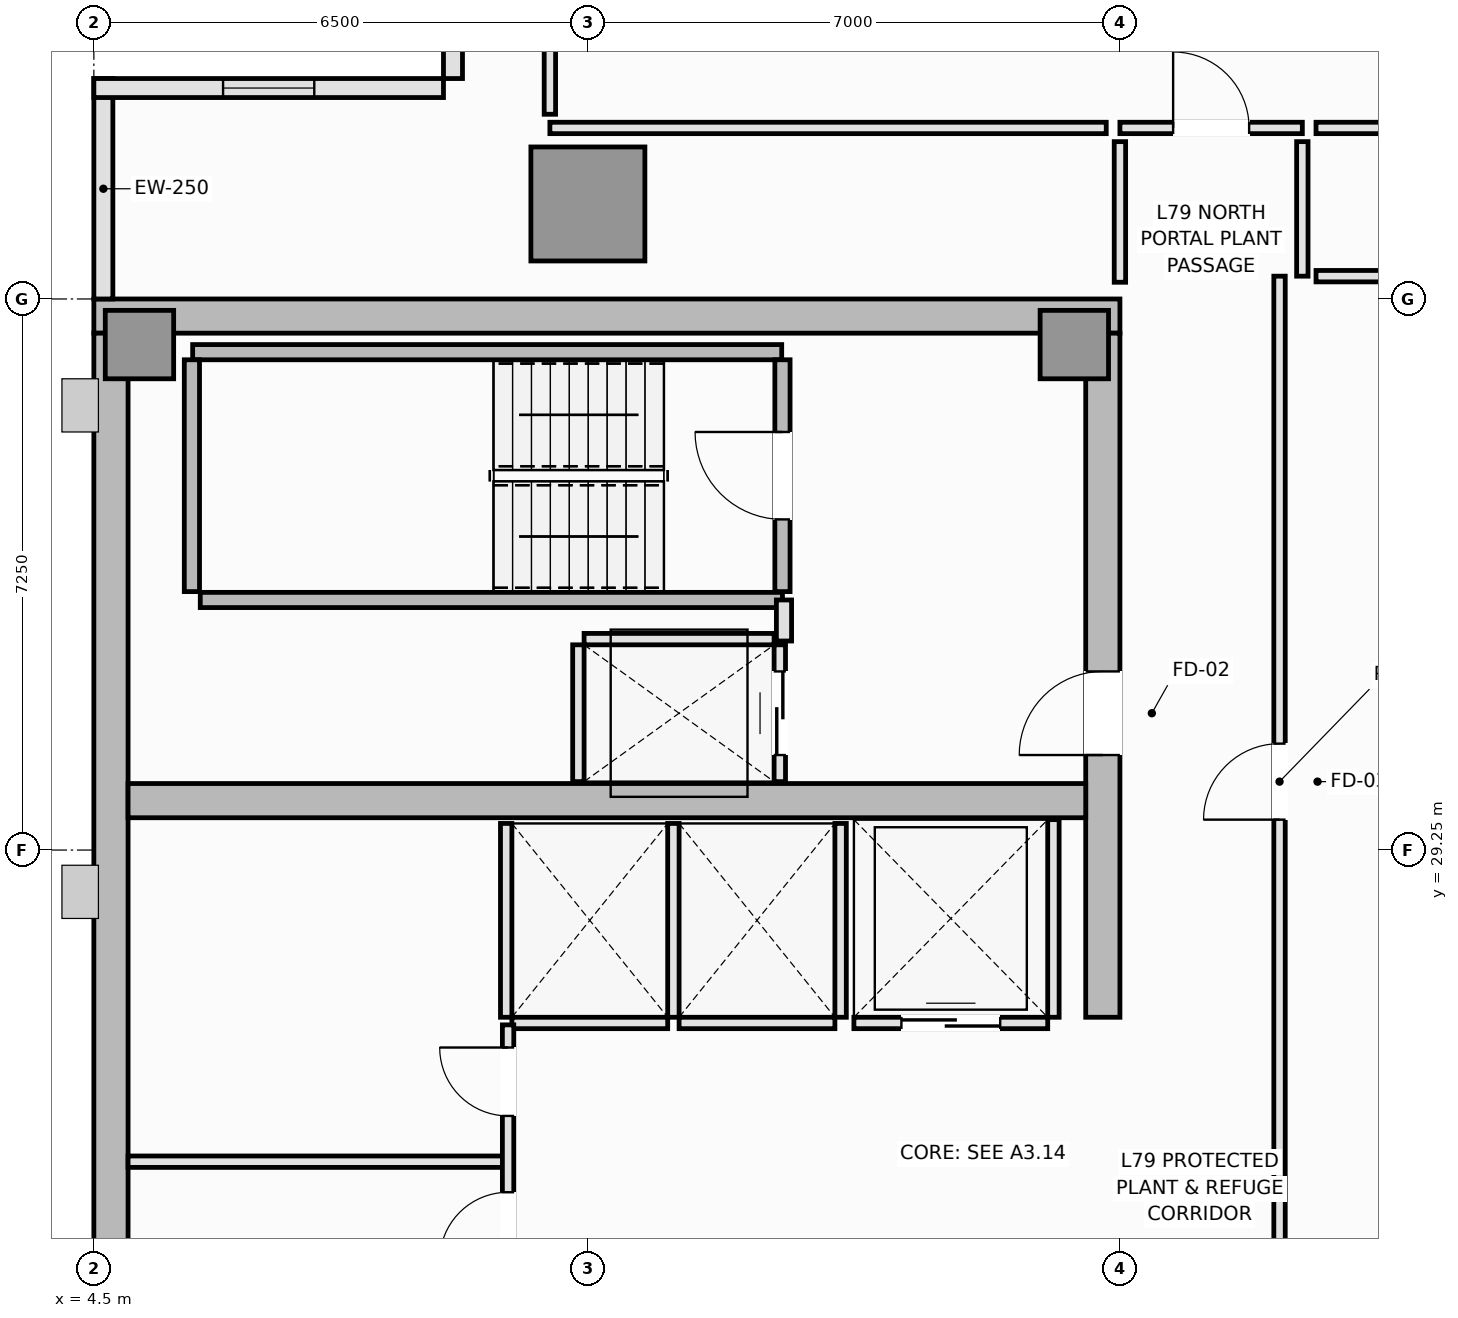
"""IFC4 building model, lengths in metres.
Left out: names, types, materials, properties, quantities, classifications, styles, units other than length and angle.
Written with IfcOpenShell. Run it as: python <this file> out.ifc"""

import sys

from ifc_helpers import new_model, si_unit, direction, frame, frame_2d, origin, origin_2d, place, context, subcontext, project, spatial, rectangle, extrude, element, fill, save


model = new_model("IFC4")
c1 = context("Model", 3, precision=1e-05, world=origin(), true_north=direction((0.0, 1.0)))
c2 = subcontext(c1, "Body", "Model", "MODEL_VIEW")
j1 = project(units=[si_unit("LENGTHUNIT", "METRE"), si_unit("PLANEANGLEUNIT", "RADIAN")], contexts=[c1])
p1 = place(None, origin())
s1 = spatial("IfcSite", under=j1, at=p1, CompositionType="ELEMENT")
p2 = place(p1, origin())
s2 = spatial("IfcBuilding", under=s1, at=p2, CompositionType="ELEMENT")
p3 = place(p2, frame((0.0, 0.0, 296.65)))
s3 = spatial("IfcBuildingStorey", under=s2, at=p3, CompositionType="ELEMENT", Elevation=296.65)
p4 = place(p3, frame((4.5, 36.275, 0.0), z_axis=(0.0, 0.0, 1.0), x_axis=(1.0, 0.0, 0.0)))
e1 = element("IfcWall", 1, at=p4, inside=s3, PredefinedType="SHEAR", context=c2, shape_type="SweptSolid", body=[
    extrude(rectangle(XDim=13.5, YDim=0.45, at=frame_2d((6.75, 0.0))), origin(), (0.0, 0.0, 1.0), 6.4),
])
p5 = place(p3, frame((4.725, 14.45, 0.0), z_axis=(0.0, 0.0, 1.0), x_axis=(0.0, 1.0, 0.0)))
e2 = element("IfcWall", 2, at=p5, inside=s3, PredefinedType="SHEAR", context=c2, shape_type="SweptSolid", body=[
    extrude(rectangle(XDim=21.6, YDim=0.45, at=frame_2d((10.8, 0.0))), origin(), (0.0, 0.0, 1.0), 6.4),
])
p6 = place(p3, frame((17.775, 27.05, 0.0), z_axis=(0.0, 0.0, 1.0), x_axis=(0.0, 1.0, 0.0)))
e3 = element("IfcWall", 3, at=p6, inside=s3, PredefinedType="SHEAR", context=c2, shape_type="SweptSolid", body=[
    extrude(rectangle(XDim=9.0, YDim=0.45, at=frame_2d((4.5, 0.0))), origin(), (0.0, 0.0, 1.0), 6.4),
])
p7 = place(p6, frame((3.45, 0.0, 0.0)))
e4 = element("IfcOpeningElement", 4, at=p7, cuts=e3, PredefinedType="OPENING", context=c2, shape_type="SweptSolid", body=[
    extrude(rectangle(XDim=1.1, YDim=2.15, at=frame_2d((0.55, 1.075))), frame((0.0, 0.235, 0.0), z_axis=(0.0, -1.0, 0.0), x_axis=(1.0, 0.0, 0.0)), (0.0, 0.0, 1.0), 0.47),
])
p8 = place(p3, frame((4.95, 29.9, 0.0), z_axis=(0.0, 0.0, 1.0), x_axis=(1.0, 0.0, 0.0)))
e5 = element("IfcWall", 5, at=p8, inside=s3, PredefinedType="SHEAR", context=c2, shape_type="SweptSolid", body=[
    extrude(rectangle(XDim=12.6, YDim=0.45, at=frame_2d((6.3, 0.0))), origin(), (0.0, 0.0, 1.0), 6.4),
])
for number, where, z_axis, x_axis in (
    (6, (5.1, 35.9, 0.0), (0.0, 0.0, 1.0), (1.0, 0.0, 0.0)),
    (7, (17.4, 35.9, 0.0), (0.0, 0.0, 1.0), (1.0, 0.0, 0.0)),
):
    element("IfcColumn", number, at=place(p3, frame(where, z_axis=z_axis, x_axis=x_axis)), inside=s3, PredefinedType="PILASTER", context=c2, shape_type="SweptSolid", body=[
        extrude(rectangle(XDim=0.9, YDim=0.9, at=origin_2d()), origin(), (0.0, 0.0, 1.0), 6.4),
    ])
p9 = place(p3, frame((11.0, 37.75, 0.0), z_axis=(0.0, 0.0, 1.0), x_axis=(1.0, 0.0, 0.0)))
e8 = element("IfcColumn", 8, at=p9, inside=s3, PredefinedType="COLUMN", context=c2, shape_type="SweptSolid", body=[
    extrude(rectangle(XDim=1.5, YDim=1.5, at=origin_2d()), origin(), (0.0, 0.0, 1.0), 6.4),
])
p10 = place(p3, frame((4.625, 39.4, 0.0), z_axis=(0.0, 0.0, 1.0), x_axis=(0.0, -1.0, 0.0)))
e9 = element("IfcWall", 9, at=p10, inside=s3, PredefinedType="SOLIDWALL", context=c2, shape_type="SweptSolid", body=[
    extrude(rectangle(XDim=2.9, YDim=0.25, at=frame_2d((1.45, 0.0))), origin(), (0.0, 0.0, 1.0), 6.2),
])
p11 = place(p3, frame((9.225, 44.0, 0.0), z_axis=(0.0, 0.0, 1.0), x_axis=(0.0, -1.0, 0.0)))
e10 = element("IfcWall", 10, at=p11, inside=s3, PredefinedType="SOLIDWALL", context=c2, shape_type="SweptSolid", body=[
    extrude(rectangle(XDim=4.6, YDim=0.25, at=frame_2d((2.3, 0.0))), origin(), (0.0, 0.0, 1.0), 6.2),
])
p12 = place(p3, frame((9.1, 39.275, 0.0), z_axis=(0.0, 0.0, 1.0), x_axis=(-1.0, 0.0, 0.0)))
e11 = element("IfcWall", 11, at=p12, inside=s3, PredefinedType="SOLIDWALL", context=c2, shape_type="SweptSolid", body=[
    extrude(rectangle(XDim=4.6, YDim=0.25, at=frame_2d((2.3, 0.0))), origin(), (0.0, 0.0, 1.0), 6.2),
])
p13 = place(p12, frame((1.7, 0.0, 0.9)))
e12 = element("IfcOpeningElement", 12, at=p13, cuts=e11, PredefinedType="OPENING", context=c2, shape_type="SweptSolid", body=[
    extrude(rectangle(XDim=1.2, YDim=1.8, at=frame_2d((0.6, 0.9))), frame((0.0, 0.135, 0.0), z_axis=(0.0, -1.0, 0.0), x_axis=(1.0, 0.0, 0.0)), (0.0, 0.0, 1.0), 0.27),
])
p14 = place(p3, frame((5.8, 35.8, 0.0), z_axis=(0.0, 0.0, 1.0), x_axis=(1.0, 0.0, 0.0)))
e13 = element("IfcWall", 13, at=p14, inside=s3, PredefinedType="SOLIDWALL", context=c2, shape_type="SweptSolid", body=[
    extrude(rectangle(XDim=7.75, YDim=0.2, at=frame_2d((3.875, 0.0))), origin(), (0.0, 0.0, 1.0), 6.4),
])
p15 = place(p3, frame((5.79, 32.65, 0.0), z_axis=(0.0, 0.0, 1.0), x_axis=(0.0, 1.0, 0.0)))
e14 = element("IfcWall", 14, at=p15, inside=s3, PredefinedType="SOLIDWALL", context=c2, shape_type="SweptSolid", body=[
    extrude(rectangle(XDim=3.05, YDim=0.2, at=frame_2d((1.525, 0.0))), origin(), (0.0, 0.0, 1.0), 6.4),
])
p16 = place(p3, frame((5.9, 32.54, 0.0), z_axis=(0.0, 0.0, 1.0), x_axis=(1.0, 0.0, 0.0)))
e15 = element("IfcWall", 15, at=p16, inside=s3, PredefinedType="SOLIDWALL", context=c2, shape_type="SweptSolid", body=[
    extrude(rectangle(XDim=7.66, YDim=0.2, at=frame_2d((3.83, 0.0))), origin(), (0.0, 0.0, 1.0), 6.4),
])
p17 = place(p3, frame((13.56, 32.65, 0.0), z_axis=(0.0, 0.0, 1.0), x_axis=(0.0, 1.0, 0.0)))
e16 = element("IfcWall", 16, at=p17, inside=s3, PredefinedType="SOLIDWALL", context=c2, shape_type="SweptSolid", body=[
    extrude(rectangle(XDim=3.05, YDim=0.2, at=frame_2d((1.525, 0.0))), origin(), (0.0, 0.0, 1.0), 6.4),
])
p18 = place(p17, frame((0.95, 0.0, 0.0)))
e17 = element("IfcOpeningElement", 17, at=p18, cuts=e16, PredefinedType="OPENING", context=c2, shape_type="SweptSolid", body=[
    extrude(rectangle(XDim=1.15, YDim=2.15, at=frame_2d((0.575, 1.075))), frame((0.0, 0.11, 0.0), z_axis=(0.0, -1.0, 0.0), x_axis=(1.0, 0.0, 0.0)), (0.0, 0.0, 1.0), 0.22),
])
p19 = place(p3, frame((10.0, 26.975, 0.0), z_axis=(0.0, 0.0, 1.0), x_axis=(1.0, 0.0, 0.0)))
e18 = element("IfcWall", 18, at=p19, inside=s3, PredefinedType="PARTITIONING", context=c2, shape_type="SweptSolid", body=[
    extrude(rectangle(XDim=2.05, YDim=0.15, at=frame_2d((1.025, 0.0))), origin(), (0.0, 0.0, 1.0), 6.2),
])
for number, where, z_axis, x_axis in (
    (19, (9.925, 27.05, 0.0), (0.0, 0.0, 1.0), (0.0, 1.0, 0.0)),
    (20, (12.125, 27.05, 0.0), (0.0, 0.0, 1.0), (0.0, 1.0, 0.0)),
):
    element("IfcWall", number, at=place(p3, frame(where, z_axis=z_axis, x_axis=x_axis)), inside=s3, PredefinedType="PARTITIONING", context=c2, shape_type="SweptSolid", body=[
        extrude(rectangle(XDim=2.55, YDim=0.15, at=frame_2d((1.275, 0.0))), origin(), (0.0, 0.0, 1.0), 6.2),
    ])
p20 = place(p3, frame((12.2, 26.975, 0.0), z_axis=(0.0, 0.0, 1.0), x_axis=(1.0, 0.0, 0.0)))
e21 = element("IfcWall", 21, at=p20, inside=s3, PredefinedType="PARTITIONING", context=c2, shape_type="SweptSolid", body=[
    extrude(rectangle(XDim=2.05, YDim=0.15, at=frame_2d((1.025, 0.0))), origin(), (0.0, 0.0, 1.0), 6.2),
])
p21 = place(p3, frame((14.325, 27.05, 0.0), z_axis=(0.0, 0.0, 1.0), x_axis=(0.0, 1.0, 0.0)))
e22 = element("IfcWall", 22, at=p21, inside=s3, PredefinedType="PARTITIONING", context=c2, shape_type="SweptSolid", body=[
    extrude(rectangle(XDim=2.55, YDim=0.15, at=frame_2d((1.275, 0.0))), origin(), (0.0, 0.0, 1.0), 6.2),
])
p22 = place(p3, frame((14.5, 26.975, 0.0), z_axis=(0.0, 0.0, 1.0), x_axis=(1.0, 0.0, 0.0)))
e23 = element("IfcWall", 23, at=p22, inside=s3, PredefinedType="PARTITIONING", context=c2, shape_type="SweptSolid", body=[
    extrude(rectangle(XDim=2.55, YDim=0.15, at=frame_2d((1.275, 0.0))), origin(), (0.0, 0.0, 1.0), 6.2),
])
p23 = place(p22, frame((0.625, 0.0, 0.0)))
e24 = element("IfcOpeningElement", 24, at=p23, cuts=e23, PredefinedType="OPENING", context=c2, shape_type="SweptSolid", body=[
    extrude(rectangle(XDim=1.3, YDim=2.2, at=frame_2d((0.65, 1.1))), frame((0.0, 0.085, 0.0), z_axis=(0.0, -1.0, 0.0), x_axis=(1.0, 0.0, 0.0)), (0.0, 0.0, 1.0), 0.17),
])
p24 = place(p3, frame((17.125, 27.05, 0.0), z_axis=(0.0, 0.0, 1.0), x_axis=(0.0, 1.0, 0.0)))
e25 = element("IfcWall", 25, at=p24, inside=s3, PredefinedType="PARTITIONING", context=c2, shape_type="SweptSolid", body=[
    extrude(rectangle(XDim=2.6, YDim=0.15, at=frame_2d((1.3, 0.0))), origin(), (0.0, 0.0, 1.0), 6.2),
])
p25 = place(p3, frame((10.95, 32.025, 0.0), z_axis=(0.0, 0.0, 1.0), x_axis=(1.0, 0.0, 0.0)))
e26 = element("IfcWall", 26, at=p25, inside=s3, PredefinedType="PARTITIONING", context=c2, shape_type="SweptSolid", body=[
    extrude(rectangle(XDim=2.5, YDim=0.15, at=frame_2d((1.25, 0.0))), origin(), (0.0, 0.0, 1.0), 6.2),
])
p26 = place(p3, frame((10.875, 30.15, 0.0), z_axis=(0.0, 0.0, 1.0), x_axis=(0.0, 1.0, 0.0)))
e27 = element("IfcWall", 27, at=p26, inside=s3, PredefinedType="PARTITIONING", context=c2, shape_type="SweptSolid", body=[
    extrude(rectangle(XDim=1.8, YDim=0.15, at=frame_2d((0.9, 0.0))), origin(), (0.0, 0.0, 1.0), 6.2),
])
p27 = place(p3, frame((13.525, 30.15, 0.0), z_axis=(0.0, 0.0, 1.0), x_axis=(0.0, 1.0, 0.0)))
e28 = element("IfcWall", 28, at=p27, inside=s3, PredefinedType="PARTITIONING", context=c2, shape_type="SweptSolid", body=[
    extrude(rectangle(XDim=1.8, YDim=0.15, at=frame_2d((0.9, 0.0))), origin(), (0.0, 0.0, 1.0), 6.2),
])
p28 = place(p27, frame((0.35, 0.0, 0.0)))
e29 = element("IfcOpeningElement", 29, at=p28, cuts=e28, PredefinedType="OPENING", context=c2, shape_type="SweptSolid", body=[
    extrude(rectangle(XDim=1.1, YDim=2.2, at=frame_2d((0.55, 1.1))), frame((0.0, 0.085, 0.0), z_axis=(0.0, -1.0, 0.0), x_axis=(1.0, 0.0, 0.0)), (0.0, 0.0, 1.0), 0.17),
])
p29 = place(p3, frame((13.58, 32.0, 0.0), z_axis=(0.0, 0.0, 1.0), x_axis=(0.0, 1.0, 0.0)))
e30 = element("IfcWall", 30, at=p29, inside=s3, PredefinedType="PARTITIONING", context=c2, shape_type="SweptSolid", body=[
    extrude(rectangle(XDim=0.54, YDim=0.2, at=frame_2d((0.27, 0.0))), origin(), (0.0, 0.0, 1.0), 6.2),
])
p30 = place(p3, frame((4.95, 25.15, 0.0), z_axis=(0.0, 0.0, 1.0), x_axis=(1.0, 0.0, 0.0)))
e31 = element("IfcWall", 31, at=p30, inside=s3, PredefinedType="PARTITIONING", context=c2, shape_type="SweptSolid", body=[
    extrude(rectangle(XDim=5.0, YDim=0.15, at=frame_2d((2.5, 0.0))), origin(), (0.0, 0.0, 1.0), 6.2),
])
p31 = place(p3, frame((9.95, 23.55, 0.0), z_axis=(0.0, 0.0, 1.0), x_axis=(0.0, 1.0, 0.0)))
e32 = element("IfcWall", 32, at=p31, inside=s3, PredefinedType="PARTITIONING", context=c2, shape_type="SweptSolid", body=[
    extrude(rectangle(XDim=3.4, YDim=0.15, at=frame_2d((1.7, 0.0))), origin(), (0.0, 0.0, 1.0), 6.2),
])
p32 = place(p31, frame((0.298, 0.0, 0.0)))
e33 = element("IfcOpeningElement", 33, at=p32, cuts=e32, PredefinedType="OPENING", context=c2, shape_type="SweptSolid", body=[
    extrude(rectangle(XDim=0.9, YDim=2.1, at=frame_2d((0.45, 1.05))), frame((0.0, 0.085, 0.0), z_axis=(0.0, -1.0, 0.0), x_axis=(1.0, 0.0, 0.0)), (0.0, 0.0, 1.0), 0.17),
])
p33 = place(p31, frame((2.202, 0.0, 0.0)))
e34 = element("IfcOpeningElement", 34, at=p33, cuts=e32, PredefinedType="OPENING", context=c2, shape_type="SweptSolid", body=[
    extrude(rectangle(XDim=0.9, YDim=2.1, at=frame_2d((0.45, 1.05))), frame((0.0, 0.085, 0.0), z_axis=(0.0, -1.0, 0.0), x_axis=(1.0, 0.0, 0.0)), (0.0, 0.0, 1.0), 0.17),
])
p34 = place(p3, frame((20.1, 23.5, 0.0), z_axis=(0.0, 0.0, 1.0), x_axis=(0.0, 1.0, 0.0)))
e35 = element("IfcWall", 35, at=p34, inside=s3, PredefinedType="PARTITIONING", context=c2, shape_type="SweptSolid", body=[
    extrude(rectangle(XDim=13.3, YDim=0.15, at=frame_2d((6.65, 0.0))), origin(), (0.0, 0.0, 1.0), 6.2),
])
p35 = place(p34, frame((6.15, 0.0, 0.0)))
e36 = element("IfcOpeningElement", 36, at=p35, cuts=e35, PredefinedType="OPENING", context=c2, shape_type="SweptSolid", body=[
    extrude(rectangle(XDim=1.0, YDim=2.15, at=frame_2d((0.5, 1.075))), frame((0.0, 0.085, 0.0), z_axis=(0.0, -1.0, 0.0), x_axis=(1.0, 0.0, 0.0)), (0.0, 0.0, 1.0), 0.17),
])
p36 = place(p3, frame((18.0, 38.75, 0.0), z_axis=(0.0, 0.0, 1.0), x_axis=(1.0, 0.0, 0.0)))
e37 = element("IfcWall", 37, at=p36, inside=s3, PredefinedType="PARTITIONING", context=c2, shape_type="SweptSolid", body=[
    extrude(rectangle(XDim=2.4, YDim=0.15, at=frame_2d((1.2, 0.0))), origin(), (0.0, 0.0, 1.0), 6.2),
])
p37 = place(p36, frame((0.7, 0.0, 0.0)))
e38 = element("IfcOpeningElement", 38, at=p37, cuts=e37, PredefinedType="OPENING", context=c2, shape_type="SweptSolid", body=[
    extrude(rectangle(XDim=1.0, YDim=2.15, at=frame_2d((0.5, 1.075))), frame((0.0, 0.085, 0.0), z_axis=(0.0, -1.0, 0.0), x_axis=(1.0, 0.0, 0.0)), (0.0, 0.0, 1.0), 0.17),
])
p38 = place(p3, frame((17.82, 38.75, 0.0), z_axis=(0.0, 0.0, 1.0), x_axis=(-1.0, 0.0, 0.0)))
e39 = element("IfcWall", 39, at=p38, inside=s3, PredefinedType="PARTITIONING", context=c2, shape_type="SweptSolid", body=[
    extrude(rectangle(XDim=7.32, YDim=0.15, at=frame_2d((3.66, 0.0))), origin(), (0.0, 0.0, 1.0), 6.2),
])
p39 = place(p3, frame((10.5, 38.93, 0.0), z_axis=(0.0, 0.0, 1.0), x_axis=(0.0, 1.0, 0.0)))
e40 = element("IfcWall", 40, at=p39, inside=s3, PredefinedType="PARTITIONING", context=c2, shape_type="SweptSolid", body=[
    extrude(rectangle(XDim=4.75, YDim=0.15, at=frame_2d((2.375, 0.0))), origin(), (0.0, 0.0, 1.0), 6.2),
])
p40 = place(p3, frame((33.82, 38.75, 0.0), z_axis=(0.0, 0.0, 1.0), x_axis=(-1.0, 0.0, 0.0)))
e41 = element("IfcWall", 41, at=p40, inside=s3, PredefinedType="PARTITIONING", context=c2, shape_type="SweptSolid", body=[
    extrude(rectangle(XDim=13.24, YDim=0.15, at=frame_2d((6.62, 0.0))), origin(), (0.0, 0.0, 1.0), 6.2),
])
p41 = place(p3, frame((20.4, 38.57, 0.0), z_axis=(0.0, 0.0, 1.0), x_axis=(0.0, -1.0, 0.0)))
e42 = element("IfcWall", 42, at=p41, inside=s3, PredefinedType="PARTITIONING", context=c2, shape_type="SweptSolid", body=[
    extrude(rectangle(XDim=1.77, YDim=0.15, at=frame_2d((0.885, 0.0))), origin(), (0.0, 0.0, 1.0), 6.2),
])
p42 = place(p3, frame((20.58, 36.8, 0.0), z_axis=(0.0, 0.0, 1.0), x_axis=(1.0, 0.0, 0.0)))
e43 = element("IfcWall", 43, at=p42, inside=s3, PredefinedType="PARTITIONING", context=c2, shape_type="SweptSolid", body=[
    extrude(rectangle(XDim=16.62, YDim=0.15, at=frame_2d((8.31, 0.0))), origin(), (0.0, 0.0, 1.0), 6.2),
])
p43 = place(p3, frame((18.0, 36.72, 0.0), z_axis=(0.0, 0.0, 1.0), x_axis=(0.0, 1.0, 0.0)))
e44 = element("IfcWall", 44, at=p43, inside=s3, PredefinedType="PARTITIONING", context=c2, shape_type="SweptSolid", body=[
    extrude(rectangle(XDim=1.85, YDim=0.15, at=frame_2d((0.925, 0.0))), origin(), (0.0, 0.0, 1.0), 6.2),
])
p44 = place(p13, origin())
e45 = element("IfcWindow", 45, at=p44, inside=s3, PartitioningType="SINGLE_PANEL", PredefinedType="WINDOW", context=c2, shape_type="SweptSolid", body=[
    extrude(rectangle(XDim=1.2, YDim=1.8, at=frame_2d((0.6, 0.9))), frame((0.0, 0.03, 0.0), z_axis=(0.0, -1.0, 0.0), x_axis=(1.0, 0.0, 0.0)), (0.0, 0.0, 1.0), 0.06),
])
fill(e12, e45)
p45 = place(p18, origin())
e46 = element("IfcDoor", 46, at=p45, inside=s3, OperationType="SINGLE_SWING_RIGHT", PredefinedType="DOOR", context=c2, shape_type="SweptSolid", body=[
    extrude(rectangle(XDim=1.15, YDim=2.15, at=frame_2d((0.575, 1.075))), frame((0.0, 0.025, 0.0), z_axis=(0.0, -1.0, 0.0), x_axis=(1.0, 0.0, 0.0)), (0.0, 0.0, 1.0), 0.05),
])
fill(e17, e46)
p46 = place(p23, origin())
e47 = element("IfcDoor", 47, at=p46, inside=s3, OperationType="DOUBLE_DOOR_SLIDING", PredefinedType="DOOR", context=c2, shape_type="SweptSolid", body=[
    extrude(rectangle(XDim=1.3, YDim=2.2, at=frame_2d((0.65, 1.1))), frame((0.0, 0.025, 0.0), z_axis=(0.0, -1.0, 0.0), x_axis=(1.0, 0.0, 0.0)), (0.0, 0.0, 1.0), 0.05),
])
fill(e24, e47)
p47 = place(p28, origin())
e48 = element("IfcDoor", 48, at=p47, inside=s3, OperationType="DOUBLE_DOOR_SLIDING", PredefinedType="DOOR", context=c2, shape_type="SweptSolid", body=[
    extrude(rectangle(XDim=1.1, YDim=2.2, at=frame_2d((0.55, 1.1))), frame((0.0, 0.025, 0.0), z_axis=(0.0, -1.0, 0.0), x_axis=(1.0, 0.0, 0.0)), (0.0, 0.0, 1.0), 0.05),
])
fill(e29, e48)
p48 = place(p7, origin())
e49 = element("IfcDoor", 49, at=p48, inside=s3, OperationType="SINGLE_SWING_LEFT", PredefinedType="DOOR", context=c2, shape_type="SweptSolid", body=[
    extrude(rectangle(XDim=1.1, YDim=2.15, at=frame_2d((0.55, 1.075))), frame((0.0, 0.025, 0.0), z_axis=(0.0, -1.0, 0.0), x_axis=(1.0, 0.0, 0.0)), (0.0, 0.0, 1.0), 0.05),
])
fill(e4, e49)
p49 = place(p32, origin())
e50 = element("IfcDoor", 50, at=p49, inside=s3, OperationType="SINGLE_SWING_LEFT", PredefinedType="DOOR", context=c2, shape_type="SweptSolid", body=[
    extrude(rectangle(XDim=0.9, YDim=2.1, at=frame_2d((0.45, 1.05))), frame((0.0, 0.025, 0.0), z_axis=(0.0, -1.0, 0.0), x_axis=(1.0, 0.0, 0.0)), (0.0, 0.0, 1.0), 0.05),
])
fill(e33, e50)
p50 = place(p33, origin())
e51 = element("IfcDoor", 51, at=p50, inside=s3, OperationType="SINGLE_SWING_RIGHT", PredefinedType="DOOR", context=c2, shape_type="SweptSolid", body=[
    extrude(rectangle(XDim=0.9, YDim=2.1, at=frame_2d((0.45, 1.05))), frame((0.0, 0.025, 0.0), z_axis=(0.0, -1.0, 0.0), x_axis=(1.0, 0.0, 0.0)), (0.0, 0.0, 1.0), 0.05),
])
fill(e34, e51)
p51 = place(p35, origin())
e52 = element("IfcDoor", 52, at=p51, inside=s3, OperationType="SINGLE_SWING_LEFT", PredefinedType="DOOR", context=c2, shape_type="SweptSolid", body=[
    extrude(rectangle(XDim=1.0, YDim=2.15, at=frame_2d((0.5, 1.075))), frame((0.0, 0.025, 0.0), z_axis=(0.0, -1.0, 0.0), x_axis=(1.0, 0.0, 0.0)), (0.0, 0.0, 1.0), 0.05),
])
fill(e36, e52)
p52 = place(p37, origin())
e53 = element("IfcDoor", 53, at=p52, inside=s3, OperationType="SINGLE_SWING_LEFT", PredefinedType="DOOR", context=c2, shape_type="SweptSolid", body=[
    extrude(rectangle(XDim=1.0, YDim=2.15, at=frame_2d((0.5, 1.075))), frame((0.0, 0.025, 0.0), z_axis=(0.0, -1.0, 0.0), x_axis=(1.0, 0.0, 0.0)), (0.0, 0.0, 1.0), 0.05),
])
fill(e38, e53)
save(model, sys.argv[1])
